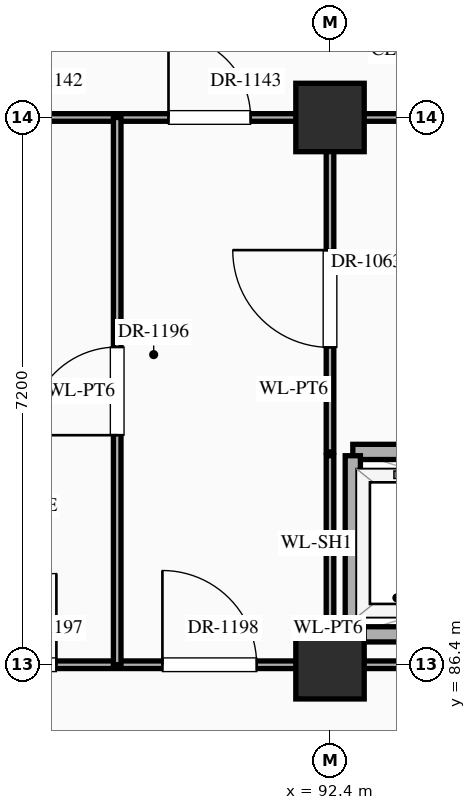
"""IFC4 building model, lengths in metres.
Left out: names, types, materials, properties, quantities, classifications, styles, units other than length and angle.
Written with IfcOpenShell. Run it as: python <this file> out.ifc"""

import sys

from ifc_helpers import new_model, si_unit, direction, frame, frame_2d, origin, origin_2d, place, context, subcontext, project, spatial, rectangle, extrude, element, fill, save


model = new_model("IFC4")
c1 = context("Model", 3, precision=1e-05, world=origin(), true_north=direction((0.0, 1.0)))
c2 = subcontext(c1, "Body", "Model", "MODEL_VIEW")
j1 = project(units=[si_unit("LENGTHUNIT", "METRE"), si_unit("PLANEANGLEUNIT", "RADIAN")], contexts=[c1])
p1 = place(None, origin())
s1 = spatial("IfcSite", under=j1, at=p1, CompositionType="ELEMENT")
p2 = place(p1, origin())
s2 = spatial("IfcBuilding", under=s1, at=p2, CompositionType="ELEMENT")
p3 = place(p2, frame((0.0, 0.0, 5.4)))
s3 = spatial("IfcBuildingStorey", under=s2, at=p3, CompositionType="ELEMENT", Elevation=5.4)
for number, where, z_axis, x_axis in (
    (1, (92.4, 86.4, 0.0), (0.0, 0.0, 1.0), (1.0, 0.0, 0.0)),
    (2, (92.4, 93.6, 0.0), (0.0, 0.0, 1.0), (1.0, 0.0, 0.0)),
):
    element("IfcColumn", number, at=place(p3, frame(where, z_axis=z_axis, x_axis=x_axis)), inside=s3, PredefinedType="COLUMN", context=c2, shape_type="SweptSolid", body=[
        extrude(rectangle(XDim=0.9, YDim=0.9, at=origin_2d()), origin(), (0.0, 0.0, 1.0), 5.4),
    ])
p4 = place(p3, frame((84.0, 86.4, 0.0), z_axis=(0.0, 0.0, 1.0), x_axis=(1.0, 0.0, 0.0)))
e3 = element("IfcWall", 3, at=p4, inside=s3, PredefinedType="STANDARD", context=c2, shape_type="SweptSolid", body=[
    extrude(rectangle(XDim=8.4, YDim=0.1, at=frame_2d((4.2, 0.0))), origin(), (0.0, 0.0, 1.0), 4.27),
])
p5 = place(p4, frame((1.025, 0.0, 0.0)))
e4 = element("IfcOpeningElement", 4, at=p5, cuts=e3, PredefinedType="OPENING", context=c2, shape_type="SweptSolid", body=[
    extrude(rectangle(XDim=1.12, YDim=2.25, at=frame_2d((0.56, 1.125))), frame((0.0, 0.062, 0.0), z_axis=(0.0, -1.0, 0.0), x_axis=(1.0, 0.0, 0.0)), (0.0, 0.0, 1.0), 0.124),
])
p6 = place(p4, frame((3.6, 0.0, 0.0)))
e5 = element("IfcOpeningElement", 5, at=p6, cuts=e3, PredefinedType="OPENING", context=c2, shape_type="SweptSolid", body=[
    extrude(rectangle(XDim=1.2, YDim=2.35, at=frame_2d((0.6, 1.175))), frame((0.0, 0.062, 0.0), z_axis=(0.0, -1.0, 0.0), x_axis=(1.0, 0.0, 0.0)), (0.0, 0.0, 1.0), 0.124),
])
p7 = place(p4, frame((6.195, 0.0, 0.0)))
e6 = element("IfcOpeningElement", 6, at=p7, cuts=e3, PredefinedType="OPENING", context=c2, shape_type="SweptSolid", body=[
    extrude(rectangle(XDim=1.24, YDim=2.3, at=frame_2d((0.62, 1.15))), frame((0.0, 0.062, 0.0), z_axis=(0.0, -1.0, 0.0), x_axis=(1.0, 0.0, 0.0)), (0.0, 0.0, 1.0), 0.124),
])
p8 = place(p3, frame((92.45, 86.4, 0.0), z_axis=(0.0, 0.0, 1.0), x_axis=(1.0, 0.0, 0.0)))
e7 = element("IfcWall", 7, at=p8, inside=s3, PredefinedType="STANDARD", context=c2, shape_type="SweptSolid", body=[
    extrude(rectangle(XDim=8.3, YDim=0.1, at=frame_2d((4.15, 0.0))), origin(), (0.0, 0.0, 1.0), 4.27),
])
p9 = place(p3, frame((92.7, 86.8, 0.0), z_axis=(0.0, 0.0, 1.0), x_axis=(1.0, 0.0, 0.0)))
e8 = element("IfcWall", 8, at=p9, inside=s3, PredefinedType="STANDARD", context=c2, shape_type="SweptSolid", body=[
    extrude(rectangle(XDim=2.5, YDim=0.2, at=frame_2d((1.25, 0.0))), origin(), (0.0, 0.0, 1.0), 5.12),
])
p10 = place(p3, frame((92.7, 89.2, 0.0), z_axis=(0.0, 0.0, 1.0), x_axis=(1.0, 0.0, 0.0)))
e9 = element("IfcWall", 9, at=p10, inside=s3, PredefinedType="STANDARD", context=c2, shape_type="SweptSolid", body=[
    extrude(rectangle(XDim=7.7, YDim=0.2, at=frame_2d((3.85, 0.0))), origin(), (0.0, 0.0, 1.0), 5.12),
])
p11 = place(p10, frame((0.725, 0.0, 0.0)))
e10 = element("IfcOpeningElement", 10, at=p11, cuts=e9, PredefinedType="OPENING", context=c2, shape_type="SweptSolid", body=[
    extrude(rectangle(XDim=1.1, YDim=2.15, at=frame_2d((0.55, 1.075))), frame((0.0, 0.112, 0.0), z_axis=(0.0, -1.0, 0.0), x_axis=(1.0, 0.0, 0.0)), (0.0, 0.0, 1.0), 0.224),
])
p12 = place(p10, frame((3.3, 0.0, 0.0)))
e11 = element("IfcOpeningElement", 11, at=p12, cuts=e9, PredefinedType="OPENING", context=c2, shape_type="SweptSolid", body=[
    extrude(rectangle(XDim=1.1, YDim=2.15, at=frame_2d((0.55, 1.075))), frame((0.0, 0.112, 0.0), z_axis=(0.0, -1.0, 0.0), x_axis=(1.0, 0.0, 0.0)), (0.0, 0.0, 1.0), 0.224),
])
p13 = place(p10, frame((5.875, 0.0, 0.0)))
e12 = element("IfcOpeningElement", 12, at=p13, cuts=e9, PredefinedType="OPENING", context=c2, shape_type="SweptSolid", body=[
    extrude(rectangle(XDim=1.1, YDim=2.15, at=frame_2d((0.55, 1.075))), frame((0.0, 0.112, 0.0), z_axis=(0.0, -1.0, 0.0), x_axis=(1.0, 0.0, 0.0)), (0.0, 0.0, 1.0), 0.224),
])
p14 = place(p3, frame((67.2, 93.6, 0.0), z_axis=(0.0, 0.0, 1.0), x_axis=(1.0, 0.0, 0.0)))
e13 = element("IfcWall", 13, at=p14, inside=s3, PredefinedType="STANDARD", context=c2, shape_type="SweptSolid", body=[
    extrude(rectangle(XDim=33.6, YDim=0.1, at=frame_2d((16.8, 0.0))), origin(), (0.0, 0.0, 1.0), 4.27),
])
p15 = place(p14, frame((3.375, 0.0, 0.0)))
e14 = element("IfcOpeningElement", 14, at=p15, cuts=e13, PredefinedType="OPENING", context=c2, shape_type="SweptSolid", body=[
    extrude(rectangle(XDim=1.65, YDim=2.4, at=frame_2d((0.825, 1.2))), frame((0.0, 0.062, 0.0), z_axis=(0.0, -1.0, 0.0), x_axis=(1.0, 0.0, 0.0)), (0.0, 0.0, 1.0), 0.124),
])
p16 = place(p14, frame((28.625, 0.0, 0.0)))
e15 = element("IfcOpeningElement", 15, at=p16, cuts=e13, PredefinedType="OPENING", context=c2, shape_type="SweptSolid", body=[
    extrude(rectangle(XDim=1.55, YDim=2.35, at=frame_2d((0.775, 1.175))), frame((0.0, 0.062, 0.0), z_axis=(0.0, -1.0, 0.0), x_axis=(1.0, 0.0, 0.0)), (0.0, 0.0, 1.0), 0.124),
])
p17 = place(p14, frame((11.65, 0.0, 0.0)))
e16 = element("IfcOpeningElement", 16, at=p17, cuts=e13, PredefinedType="OPENING", context=c2, shape_type="SweptSolid", body=[
    extrude(rectangle(XDim=1.9, YDim=2.5, at=frame_2d((0.95, 1.25))), frame((0.0, 0.062, 0.0), z_axis=(0.0, -1.0, 0.0), x_axis=(1.0, 0.0, 0.0)), (0.0, 0.0, 1.0), 0.124),
])
p18 = place(p14, frame((17.885, 0.0, 0.0)))
e17 = element("IfcOpeningElement", 17, at=p18, cuts=e13, PredefinedType="OPENING", context=c2, shape_type="SweptSolid", body=[
    extrude(rectangle(XDim=1.0, YDim=2.25, at=frame_2d((0.5, 1.125))), frame((0.0, 0.062, 0.0), z_axis=(0.0, -1.0, 0.0), x_axis=(1.0, 0.0, 0.0)), (0.0, 0.0, 1.0), 0.124),
])
p19 = place(p14, frame((20.48, 0.0, 0.0)))
e18 = element("IfcOpeningElement", 18, at=p19, cuts=e13, PredefinedType="OPENING", context=c2, shape_type="SweptSolid", body=[
    extrude(rectangle(XDim=1.04, YDim=2.2, at=frame_2d((0.52, 1.1))), frame((0.0, 0.062, 0.0), z_axis=(0.0, -1.0, 0.0), x_axis=(1.0, 0.0, 0.0)), (0.0, 0.0, 1.0), 0.124),
])
p20 = place(p14, frame((23.075, 0.0, 0.0)))
e19 = element("IfcOpeningElement", 19, at=p20, cuts=e13, PredefinedType="OPENING", context=c2, shape_type="SweptSolid", body=[
    extrude(rectangle(XDim=1.08, YDim=2.25, at=frame_2d((0.54, 1.125))), frame((0.0, 0.062, 0.0), z_axis=(0.0, -1.0, 0.0), x_axis=(1.0, 0.0, 0.0)), (0.0, 0.0, 1.0), 0.124),
])
p21 = place(p3, frame((89.6, 86.4, 0.0), z_axis=(0.0, 0.0, 1.0), x_axis=(0.0, 1.0, 0.0)))
e20 = element("IfcWall", 20, at=p21, inside=s3, PredefinedType="STANDARD", context=c2, shape_type="SweptSolid", body=[
    extrude(rectangle(XDim=7.2, YDim=0.1, at=frame_2d((3.6, 0.0))), origin(), (0.0, 0.0, 1.0), 5.12),
])
p22 = place(p21, frame((3.02, 0.0, 0.0)))
e21 = element("IfcOpeningElement", 21, at=p22, cuts=e20, PredefinedType="OPENING", context=c2, shape_type="SweptSolid", body=[
    extrude(rectangle(XDim=1.16, YDim=2.3, at=frame_2d((0.58, 1.15))), frame((0.0, 0.062, 0.0), z_axis=(0.0, -1.0, 0.0), x_axis=(1.0, 0.0, 0.0)), (0.0, 0.0, 1.0), 0.124),
])
p23 = place(p3, frame((92.4, 86.45, 0.0), z_axis=(0.0, 0.0, 1.0), x_axis=(0.0, 1.0, 0.0)))
e22 = element("IfcWall", 22, at=p23, inside=s3, PredefinedType="STANDARD", context=c2, shape_type="SweptSolid", body=[
    extrude(rectangle(XDim=2.7, YDim=0.1, at=frame_2d((1.35, 0.0))), origin(), (0.0, 0.0, 1.0), 4.37),
])
p24 = place(p3, frame((92.4, 89.2, 0.0), z_axis=(0.0, 0.0, 1.0), x_axis=(0.0, 1.0, 0.0)))
e23 = element("IfcWall", 23, at=p24, inside=s3, PredefinedType="STANDARD", context=c2, shape_type="SweptSolid", body=[
    extrude(rectangle(XDim=4.4, YDim=0.1, at=frame_2d((2.2, 0.0))), origin(), (0.0, 0.0, 1.0), 4.37),
])
p25 = place(p24, frame((1.375, 0.0, 0.0)))
e24 = element("IfcOpeningElement", 24, at=p25, cuts=e23, PredefinedType="OPENING", context=c2, shape_type="SweptSolid", body=[
    extrude(rectangle(XDim=1.28, YDim=2.35, at=frame_2d((0.64, 1.175))), frame((0.0, 0.062, 0.0), z_axis=(0.0, -1.0, 0.0), x_axis=(1.0, 0.0, 0.0)), (0.0, 0.0, 1.0), 0.124),
])
p26 = place(p3, frame((92.7, 86.85, 0.0), z_axis=(0.0, 0.0, 1.0), x_axis=(0.0, 1.0, 0.0)))
e25 = element("IfcWall", 25, at=p26, inside=s3, PredefinedType="STANDARD", context=c2, shape_type="SweptSolid", body=[
    extrude(rectangle(XDim=2.3, YDim=0.2, at=frame_2d((1.15, 0.0))), origin(), (0.0, 0.0, 1.0), 5.12),
])
p27 = place(p25, origin())
e26 = element("IfcDoor", 26, at=p27, inside=s3, OperationType="SINGLE_SWING_RIGHT", PredefinedType="DOOR", context=c2, shape_type="SweptSolid", body=[
    extrude(rectangle(XDim=1.28, YDim=2.35, at=frame_2d((0.64, 1.175))), frame((0.0, 0.025, 0.0), z_axis=(0.0, -1.0, 0.0), x_axis=(1.0, 0.0, 0.0)), (0.0, 0.0, 1.0), 0.05),
])
fill(e24, e26)
p28 = place(p20, origin())
e27 = element("IfcDoor", 27, at=p28, inside=s3, OperationType="SINGLE_SWING_LEFT", PredefinedType="DOOR", context=c2, shape_type="SweptSolid", body=[
    extrude(rectangle(XDim=1.08, YDim=2.25, at=frame_2d((0.54, 1.125))), frame((0.0, 0.025, 0.0), z_axis=(0.0, -1.0, 0.0), x_axis=(1.0, 0.0, 0.0)), (0.0, 0.0, 1.0), 0.05),
])
fill(e19, e27)
p29 = place(p22, origin())
e28 = element("IfcDoor", 28, at=p29, inside=s3, OperationType="SINGLE_SWING_LEFT", PredefinedType="DOOR", context=c2, shape_type="SweptSolid", body=[
    extrude(rectangle(XDim=1.16, YDim=2.3, at=frame_2d((0.58, 1.15))), frame((0.0, 0.025, 0.0), z_axis=(0.0, -1.0, 0.0), x_axis=(1.0, 0.0, 0.0)), (0.0, 0.0, 1.0), 0.05),
])
fill(e21, e28)
p30 = place(p6, origin())
e29 = element("IfcDoor", 29, at=p30, inside=s3, OperationType="SINGLE_SWING_RIGHT", PredefinedType="DOOR", context=c2, shape_type="SweptSolid", body=[
    extrude(rectangle(XDim=1.2, YDim=2.35, at=frame_2d((0.6, 1.175))), frame((0.0, 0.025, 0.0), z_axis=(0.0, -1.0, 0.0), x_axis=(1.0, 0.0, 0.0)), (0.0, 0.0, 1.0), 0.05),
])
fill(e5, e29)
p31 = place(p7, origin())
e30 = element("IfcDoor", 30, at=p31, inside=s3, OperationType="SINGLE_SWING_LEFT", PredefinedType="DOOR", context=c2, shape_type="SweptSolid", body=[
    extrude(rectangle(XDim=1.24, YDim=2.3, at=frame_2d((0.62, 1.15))), frame((0.0, 0.025, 0.0), z_axis=(0.0, -1.0, 0.0), x_axis=(1.0, 0.0, 0.0)), (0.0, 0.0, 1.0), 0.05),
])
fill(e6, e30)
save(model, sys.argv[1])
